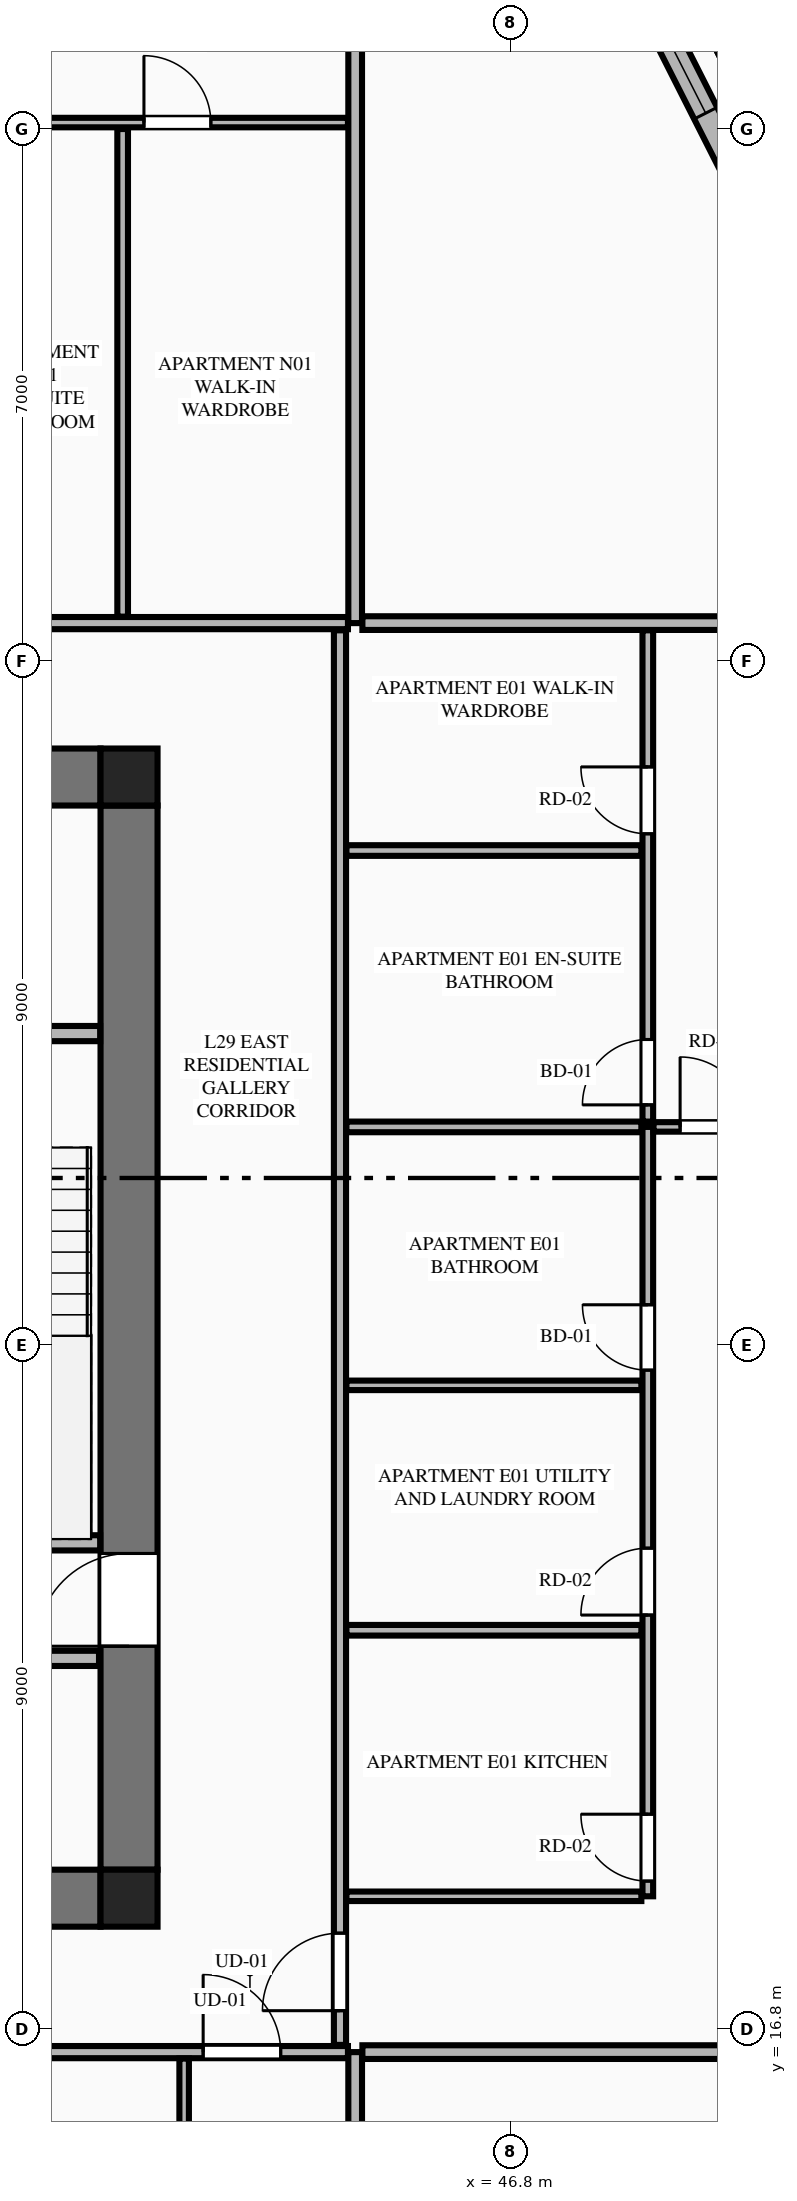
"""IFC4 building model, lengths in metres.
Left out: names, types, materials, properties, quantities, classifications, styles, units other than length and angle.
Written with IfcOpenShell. Run it as: python <this file> out.ifc"""

import sys

from ifc_helpers import new_model, si_unit, direction, frame, frame_2d, origin, origin_2d, place, context, subcontext, project, spatial, rectangle, extrude, element, fill, save


model = new_model("IFC4")
c1 = context("Model", 3, precision=1e-05, world=origin(), true_north=direction((0.0, 1.0)))
c2 = subcontext(c1, "Body", "Model", "MODEL_VIEW")
j1 = project(units=[si_unit("LENGTHUNIT", "METRE"), si_unit("PLANEANGLEUNIT", "RADIAN")], contexts=[c1])
p1 = place(None, origin())
s1 = spatial("IfcSite", under=j1, at=p1, CompositionType="ELEMENT")
p2 = place(p1, origin())
s2 = spatial("IfcBuilding", under=s1, at=p2, CompositionType="ELEMENT")
p3 = place(p2, frame((0.0, 0.0, 112.6)))
s3 = spatial("IfcBuildingStorey", under=s2, at=p3, CompositionType="ELEMENT", Elevation=112.6)
for number, where, z_axis, x_axis in (
    (1, (41.775, 18.525, 0.0), (0.0, 0.0, 1.0), (1.0, 0.0, 0.0)),
    (2, (41.775, 33.275, 0.0), (0.0, 0.0, 1.0), (1.0, 0.0, 0.0)),
):
    element("IfcColumn", number, at=place(p3, frame(where, z_axis=z_axis, x_axis=x_axis)), inside=s3, PredefinedType="COLUMN", context=c2, shape_type="SweptSolid", body=[
        extrude(rectangle(XDim=0.75, YDim=0.75, at=origin_2d()), origin(), (0.0, 0.0, 1.0), 3.55),
    ])
for number, where, z_axis, x_axis in (
    (3, (23.4, 18.525, 0.0), (0.0, 0.0, 1.0), (1.0, 0.0, 0.0)),
    (4, (23.4, 33.275, 0.0), (0.0, 0.0, 1.0), (1.0, 0.0, 0.0)),
):
    element("IfcWall", number, at=place(p3, frame(where, z_axis=z_axis, x_axis=x_axis)), inside=s3, PredefinedType="SHEAR", context=c2, shape_type="SweptSolid", body=[
        extrude(rectangle(XDim=18.0, YDim=0.75, at=frame_2d((9.0, 0.0))), origin(), (0.0, 0.0, 1.0), 3.34),
    ])
p4 = place(p3, frame((41.775, 18.9, 0.0), z_axis=(0.0, 0.0, 1.0), x_axis=(0.0, 1.0, 0.0)))
e5 = element("IfcWall", 5, at=p4, inside=s3, PredefinedType="SHEAR", context=c2, shape_type="SweptSolid", body=[
    extrude(rectangle(XDim=14.0, YDim=0.75, at=frame_2d((7.0, 0.0))), origin(), (0.0, 0.0, 1.0), 3.34),
])
p5 = place(p4, frame((2.94, 0.0, 0.0)))
e6 = element("IfcOpeningElement", 6, at=p5, cuts=e5, PredefinedType="OPENING", context=c2, shape_type="SweptSolid", body=[
    extrude(rectangle(XDim=1.22, YDim=2.25, at=frame_2d((0.61, 1.125))), frame((0.0, 0.385, 0.0), z_axis=(0.0, -1.0, 0.0), x_axis=(1.0, 0.0, 0.0)), (0.0, 0.0, 1.0), 0.77),
])
p6 = place(p3, frame((38.125, 23.2, 0.0), z_axis=(0.0, 0.0, 1.0), x_axis=(1.0, 0.0, 0.0)))
e7 = element("IfcWall", 7, at=p6, inside=s3, PredefinedType="PLUMBINGWALL", context=c2, shape_type="SweptSolid", body=[
    extrude(rectangle(XDim=3.27, YDim=0.2, at=frame_2d((1.635, 0.0))), origin(), (0.0, 0.0, 1.0), 3.34),
])
p7 = place(p3, frame((38.125, 29.9, 0.0), z_axis=(0.0, 0.0, 1.0), x_axis=(1.0, 0.0, 0.0)))
e8 = element("IfcWall", 8, at=p7, inside=s3, PredefinedType="PLUMBINGWALL", context=c2, shape_type="SweptSolid", body=[
    extrude(rectangle(XDim=3.27, YDim=0.2, at=frame_2d((1.635, 0.0))), origin(), (0.0, 0.0, 1.0), 3.34),
])
p8 = place(p7, frame((0.5, 0.0, 0.0)))
e9 = element("IfcOpeningElement", 9, at=p8, cuts=e8, PredefinedType="OPENING", context=c2, shape_type="SweptSolid", body=[
    extrude(rectangle(XDim=0.85, YDim=2.05, at=frame_2d((0.425, 1.025))), frame((0.0, 0.11, 0.0), z_axis=(0.0, -1.0, 0.0), x_axis=(1.0, 0.0, 0.0)), (0.0, 0.0, 1.0), 0.22),
])
p9 = place(p3, frame((23.42, 21.68, 0.0), z_axis=(0.0, 0.0, 1.0), x_axis=(1.0, 0.0, 0.0)))
e10 = element("IfcWall", 10, at=p9, inside=s3, PredefinedType="PLUMBINGWALL", context=c2, shape_type="SweptSolid", body=[
    extrude(rectangle(XDim=17.96, YDim=0.2, at=frame_2d((8.98, 0.0))), origin(), (0.0, 0.0, 1.0), 3.34),
])
p10 = place(p9, frame((11.6, 0.0, 0.0)))
e11 = element("IfcOpeningElement", 11, at=p10, cuts=e10, PredefinedType="OPENING", context=c2, shape_type="SweptSolid", body=[
    extrude(rectangle(XDim=1.1, YDim=2.2, at=frame_2d((0.55, 1.1))), frame((0.0, 0.11, 0.0), z_axis=(0.0, -1.0, 0.0), x_axis=(1.0, 0.0, 0.0)), (0.0, 0.0, 1.0), 0.22),
])
p11 = place(p9, frame((0.41, 0.0, 0.0)))
e12 = element("IfcOpeningElement", 12, at=p11, cuts=e10, PredefinedType="OPENING", context=c2, shape_type="SweptSolid", body=[
    extrude(rectangle(XDim=0.85, YDim=2.05, at=frame_2d((0.425, 1.025))), frame((0.0, 0.11, 0.0), z_axis=(0.0, -1.0, 0.0), x_axis=(1.0, 0.0, 0.0)), (0.0, 0.0, 1.0), 0.22),
])
p12 = place(p9, frame((13.78, 0.0, 0.0)))
e13 = element("IfcOpeningElement", 13, at=p12, cuts=e10, PredefinedType="OPENING", context=c2, shape_type="SweptSolid", body=[
    extrude(rectangle(XDim=0.85, YDim=2.05, at=frame_2d((0.425, 1.025))), frame((0.0, 0.11, 0.0), z_axis=(0.0, -1.0, 0.0), x_axis=(1.0, 0.0, 0.0)), (0.0, 0.0, 1.0), 0.22),
])
p13 = place(p9, frame((16.13, 0.0, 0.0)))
e14 = element("IfcOpeningElement", 14, at=p13, cuts=e10, PredefinedType="OPENING", context=c2, shape_type="SweptSolid", body=[
    extrude(rectangle(XDim=0.85, YDim=2.05, at=frame_2d((0.425, 1.025))), frame((0.0, 0.11, 0.0), z_axis=(0.0, -1.0, 0.0), x_axis=(1.0, 0.0, 0.0)), (0.0, 0.0, 1.0), 0.22),
])
p14 = place(p3, frame((50.251, 40.251, 0.0), z_axis=(0.0, 0.0, 1.0), x_axis=(-0.451548465867, 0.892246593142, 0.0)))
e15 = element("IfcWall", 15, at=p14, inside=s3, PredefinedType="STANDARD", context=c2, shape_type="SweptSolid", body=[
    extrude(rectangle(XDim=5.04, YDim=0.34, at=frame_2d((2.52, 0.0))), origin(), (0.0, 0.0, 1.0), 2.797),
])
p15 = place(p14, frame((1.97, 0.0, 0.75)))
e16 = element("IfcOpeningElement", 16, at=p15, cuts=e15, PredefinedType="OPENING", context=c2, shape_type="SweptSolid", body=[
    extrude(rectangle(XDim=1.1, YDim=1.897, at=frame_2d((0.55, 0.948))), frame((0.0, 0.18, 0.0), z_axis=(0.0, -1.0, 0.0), x_axis=(1.0, 0.0, 0.0)), (0.0, 0.0, 1.0), 0.36),
])
p16 = place(p3, frame((44.75, 4.105, 0.0), z_axis=(0.0, 0.0, 1.0), x_axis=(0.0, 1.0, 0.0)))
e17 = element("IfcWall", 17, at=p16, inside=s3, PredefinedType="PARTITIONING", context=c2, shape_type="SweptSolid", body=[
    extrude(rectangle(XDim=12.395, YDim=0.18, at=frame_2d((6.198, 0.0))), origin(), (0.0, 0.0, 1.0), 3.34),
])
p17 = place(p3, frame((28.663, 16.5, 0.0), z_axis=(0.0, 0.0, 1.0), x_axis=(1.0, 0.0, 0.0)))
e18 = element("IfcWall", 18, at=p17, inside=s3, PredefinedType="PARTITIONING", context=c2, shape_type="SweptSolid", body=[
    extrude(rectangle(XDim=15.992, YDim=0.16, at=frame_2d((7.996, 0.0))), origin(), (0.0, 0.0, 1.0), 3.34),
])
p18 = place(p17, frame((14.087, 0.0, 0.0)))
e19 = element("IfcOpeningElement", 19, at=p18, cuts=e18, PredefinedType="OPENING", context=c2, shape_type="SweptSolid", body=[
    extrude(rectangle(XDim=1.02, YDim=2.25, at=frame_2d((0.51, 1.125))), frame((0.0, 0.09, 0.0), z_axis=(0.0, -1.0, 0.0), x_axis=(1.0, 0.0, 0.0)), (0.0, 0.0, 1.0), 0.18),
])
p19 = place(p3, frame((42.5, 12.391, 0.0), z_axis=(0.0, 0.0, 1.0), x_axis=(0.0, 1.0, 0.0)))
e20 = element("IfcWall", 20, at=p19, inside=s3, PredefinedType="PARTITIONING", context=c2, shape_type="SweptSolid", body=[
    extrude(rectangle(XDim=4.024, YDim=0.125, at=frame_2d((2.012, 0.0))), origin(), (0.0, 0.0, 1.0), 2.722),
])
p20 = place(p3, frame((44.75, 35.3, 0.0), z_axis=(0.0, 0.0, 1.0), x_axis=(0.0, 1.0, 0.0)))
e21 = element("IfcWall", 21, at=p20, inside=s3, PredefinedType="PARTITIONING", context=c2, shape_type="SweptSolid", body=[
    extrude(rectangle(XDim=12.195, YDim=0.18, at=frame_2d((6.098, 0.0))), origin(), (0.0, 0.0, 1.0), 3.34),
])
p21 = place(p3, frame((20.145, 35.3, 0.0), z_axis=(0.0, 0.0, 1.0), x_axis=(1.0, 0.0, 0.0)))
e22 = element("IfcWall", 22, at=p21, inside=s3, PredefinedType="PARTITIONING", context=c2, shape_type="SweptSolid", body=[
    extrude(rectangle(XDim=24.51, YDim=0.16, at=frame_2d((12.255, 0.0))), origin(), (0.0, 0.0, 1.0), 3.34),
])
p22 = place(p21, frame((0.405, 0.0, 0.0)))
e23 = element("IfcOpeningElement", 23, at=p22, cuts=e22, PredefinedType="OPENING", context=c2, shape_type="SweptSolid", body=[
    extrude(rectangle(XDim=1.35, YDim=2.35, at=frame_2d((0.675, 1.175))), frame((0.0, 0.09, 0.0), z_axis=(0.0, -1.0, 0.0), x_axis=(1.0, 0.0, 0.0)), (0.0, 0.0, 1.0), 0.18),
])
p23 = place(p3, frame((34.643, 41.885, 0.0), z_axis=(0.0, 0.0, 1.0), x_axis=(1.0, 0.0, 0.0)))
e24 = element("IfcWall", 24, at=p23, inside=s3, PredefinedType="PARTITIONING", context=c2, shape_type="SweptSolid", body=[
    extrude(rectangle(XDim=10.012, YDim=0.125, at=frame_2d((5.006, 0.0))), origin(), (0.0, 0.0, 1.0), 3.34),
])
p24 = place(p23, frame((5.18, 0.0, 0.0)))
e25 = element("IfcOpeningElement", 25, at=p24, cuts=e24, PredefinedType="OPENING", context=c2, shape_type="SweptSolid", body=[
    extrude(rectangle(XDim=0.86, YDim=2.1, at=frame_2d((0.43, 1.05))), frame((0.0, 0.073, 0.0), z_axis=(0.0, -1.0, 0.0), x_axis=(1.0, 0.0, 0.0)), (0.0, 0.0, 1.0), 0.145),
])
p25 = place(p23, frame((7.328, 0.0, 0.0)))
e26 = element("IfcOpeningElement", 26, at=p25, cuts=e24, PredefinedType="OPENING", context=c2, shape_type="SweptSolid", body=[
    extrude(rectangle(XDim=0.88, YDim=2.15, at=frame_2d((0.44, 1.075))), frame((0.0, 0.073, 0.0), z_axis=(0.0, -1.0, 0.0), x_axis=(1.0, 0.0, 0.0)), (0.0, 0.0, 1.0), 0.145),
])
p26 = place(p23, frame((0.3, 0.0, 0.0)))
e27 = element("IfcOpeningElement", 27, at=p26, cuts=e24, PredefinedType="OPENING", context=c2, shape_type="SweptSolid", body=[
    extrude(rectangle(XDim=0.88, YDim=2.15, at=frame_2d((0.44, 1.075))), frame((0.0, 0.073, 0.0), z_axis=(0.0, -1.0, 0.0), x_axis=(1.0, 0.0, 0.0)), (0.0, 0.0, 1.0), 0.145),
])
p27 = place(p3, frame((41.691, 35.385, 0.0), z_axis=(0.0, 0.0, 1.0), x_axis=(0.0, 1.0, 0.0)))
e28 = element("IfcWall", 28, at=p27, inside=s3, PredefinedType="PLUMBINGWALL", context=c2, shape_type="SweptSolid", body=[
    extrude(rectangle(XDim=6.415, YDim=0.14, at=frame_2d((3.208, 0.0))), origin(), (0.0, 0.0, 1.0), 2.722),
])
p28 = place(p3, frame((44.845, 16.5, 0.0), z_axis=(0.0, 0.0, 1.0), x_axis=(1.0, 0.0, 0.0)))
e29 = element("IfcWall", 29, at=p28, inside=s3, PredefinedType="PARTITIONING", context=c2, shape_type="SweptSolid", body=[
    extrude(rectangle(XDim=7.77, YDim=0.18, at=frame_2d((3.885, 0.0))), origin(), (0.0, 0.0, 1.0), 3.34),
])
p29 = place(p3, frame((44.845, 35.3, 0.0), z_axis=(0.0, 0.0, 1.0), x_axis=(1.0, 0.0, 0.0)))
e30 = element("IfcWall", 30, at=p29, inside=s3, PredefinedType="PARTITIONING", context=c2, shape_type="SweptSolid", body=[
    extrude(rectangle(XDim=7.669, YDim=0.18, at=frame_2d((3.834, 0.0))), origin(), (0.0, 0.0, 1.0), 3.34),
])
p30 = place(p3, frame((44.55, 16.595, 0.0), z_axis=(0.0, 0.0, 1.0), x_axis=(0.0, 1.0, 0.0)))
e31 = element("IfcWall", 31, at=p30, inside=s3, PredefinedType="PARTITIONING", context=c2, shape_type="SweptSolid", body=[
    extrude(rectangle(XDim=18.61, YDim=0.16, at=frame_2d((9.305, 0.0))), origin(), (0.0, 0.0, 1.0), 3.34),
])
p31 = place(p30, frame((0.45, 0.0, 0.0)))
e32 = element("IfcOpeningElement", 32, at=p31, cuts=e31, PredefinedType="OPENING", context=c2, shape_type="SweptSolid", body=[
    extrude(rectangle(XDim=1.02, YDim=2.25, at=frame_2d((0.51, 1.125))), frame((0.0, 0.09, 0.0), z_axis=(0.0, -1.0, 0.0), x_axis=(1.0, 0.0, 0.0)), (0.0, 0.0, 1.0), 0.18),
])
p32 = place(p3, frame((44.635, 18.55, 0.0), z_axis=(0.0, 0.0, 1.0), x_axis=(1.0, 0.0, 0.0)))
e33 = element("IfcWall", 33, at=p32, inside=s3, PredefinedType="PARTITIONING", context=c2, shape_type="SweptSolid", body=[
    extrude(rectangle(XDim=3.88, YDim=0.125, at=frame_2d((1.94, 0.0))), origin(), (0.0, 0.0, 1.0), 2.722),
])
p33 = place(p3, frame((48.6, 18.55, 0.0), z_axis=(0.0, 0.0, 1.0), x_axis=(0.0, 1.0, 0.0)))
e34 = element("IfcWall", 34, at=p33, inside=s3, PredefinedType="PLUMBINGWALL", context=c2, shape_type="SweptSolid", body=[
    extrude(rectangle(XDim=10.122, YDim=0.14, at=frame_2d((5.061, 0.0))), origin(), (0.0, 0.0, 1.0), 3.34),
])
p34 = place(p33, frame((0.2, 0.0, 0.0)))
e35 = element("IfcOpeningElement", 35, at=p34, cuts=e34, PredefinedType="OPENING", context=c2, shape_type="SweptSolid", body=[
    extrude(rectangle(XDim=0.88, YDim=2.15, at=frame_2d((0.44, 1.075))), frame((0.0, 0.08, 0.0), z_axis=(0.0, -1.0, 0.0), x_axis=(1.0, 0.0, 0.0)), (0.0, 0.0, 1.0), 0.16),
])
p35 = place(p33, frame((3.7, 0.0, 0.0)))
e36 = element("IfcOpeningElement", 36, at=p35, cuts=e34, PredefinedType="OPENING", context=c2, shape_type="SweptSolid", body=[
    extrude(rectangle(XDim=0.88, YDim=2.15, at=frame_2d((0.44, 1.075))), frame((0.0, 0.08, 0.0), z_axis=(0.0, -1.0, 0.0), x_axis=(1.0, 0.0, 0.0)), (0.0, 0.0, 1.0), 0.16),
])
p36 = place(p33, frame((6.922, 0.0, 0.0)))
e37 = element("IfcOpeningElement", 37, at=p36, cuts=e34, PredefinedType="OPENING", context=c2, shape_type="SweptSolid", body=[
    extrude(rectangle(XDim=0.86, YDim=2.1, at=frame_2d((0.43, 1.05))), frame((0.0, 0.08, 0.0), z_axis=(0.0, -1.0, 0.0), x_axis=(1.0, 0.0, 0.0)), (0.0, 0.0, 1.0), 0.16),
])
p37 = place(p3, frame((48.6, 28.742, 0.0), z_axis=(0.0, 0.0, 1.0), x_axis=(0.0, 1.0, 0.0)))
e38 = element("IfcWall", 38, at=p37, inside=s3, PredefinedType="PLUMBINGWALL", context=c2, shape_type="SweptSolid", body=[
    extrude(rectangle(XDim=6.463, YDim=0.14, at=frame_2d((3.231, 0.0))), origin(), (0.0, 0.0, 1.0), 3.34),
])
p38 = place(p37, frame((0.22, 0.0, 0.0)))
e39 = element("IfcOpeningElement", 39, at=p38, cuts=e38, PredefinedType="OPENING", context=c2, shape_type="SweptSolid", body=[
    extrude(rectangle(XDim=0.86, YDim=2.1, at=frame_2d((0.43, 1.05))), frame((0.0, 0.08, 0.0), z_axis=(0.0, -1.0, 0.0), x_axis=(1.0, 0.0, 0.0)), (0.0, 0.0, 1.0), 0.16),
])
p39 = place(p37, frame((3.786, 0.0, 0.0)))
e40 = element("IfcOpeningElement", 40, at=p39, cuts=e38, PredefinedType="OPENING", context=c2, shape_type="SweptSolid", body=[
    extrude(rectangle(XDim=0.88, YDim=2.15, at=frame_2d((0.44, 1.075))), frame((0.0, 0.08, 0.0), z_axis=(0.0, -1.0, 0.0), x_axis=(1.0, 0.0, 0.0)), (0.0, 0.0, 1.0), 0.16),
])
p40 = place(p3, frame((44.635, 28.672, 0.0), z_axis=(0.0, 0.0, 1.0), x_axis=(1.0, 0.0, 0.0)))
e41 = element("IfcWall", 41, at=p40, inside=s3, PredefinedType="PLUMBINGWALL", context=c2, shape_type="SweptSolid", body=[
    extrude(rectangle(XDim=3.88, YDim=0.14, at=frame_2d((1.94, 0.0))), origin(), (0.0, 0.0, 1.0), 3.34),
])
p41 = place(p3, frame((48.675, 28.672, 0.0), z_axis=(0.0, 0.0, 1.0), x_axis=(1.0, 0.0, 0.0)))
e42 = element("IfcWall", 42, at=p41, inside=s3, PredefinedType="PARTITIONING", context=c2, shape_type="SweptSolid", body=[
    extrude(rectangle(XDim=7.208, YDim=0.125, at=frame_2d((3.604, 0.0))), origin(), (0.0, 0.0, 1.0), 3.34),
])
p42 = place(p41, frame((0.35, 0.0, 0.0)))
e43 = element("IfcOpeningElement", 43, at=p42, cuts=e42, PredefinedType="OPENING", context=c2, shape_type="SweptSolid", body=[
    extrude(rectangle(XDim=0.92, YDim=2.15, at=frame_2d((0.46, 1.075))), frame((0.0, 0.073, 0.0), z_axis=(0.0, -1.0, 0.0), x_axis=(1.0, 0.0, 0.0)), (0.0, 0.0, 1.0), 0.145),
])
p43 = place(p3, frame((44.635, 22.05, 0.0), z_axis=(0.0, 0.0, 1.0), x_axis=(1.0, 0.0, 0.0)))
e44 = element("IfcWall", 44, at=p43, inside=s3, PredefinedType="PLUMBINGWALL", context=c2, shape_type="SweptSolid", body=[
    extrude(rectangle(XDim=3.88, YDim=0.14, at=frame_2d((1.94, 0.0))), origin(), (0.0, 0.0, 1.0), 3.34),
])
p44 = place(p3, frame((44.635, 25.272, 0.0), z_axis=(0.0, 0.0, 1.0), x_axis=(1.0, 0.0, 0.0)))
e45 = element("IfcWall", 45, at=p44, inside=s3, PredefinedType="PARTITIONING", context=c2, shape_type="SweptSolid", body=[
    extrude(rectangle(XDim=3.88, YDim=0.125, at=frame_2d((1.94, 0.0))), origin(), (0.0, 0.0, 1.0), 3.34),
])
p45 = place(p3, frame((44.635, 32.308, 0.0), z_axis=(0.0, 0.0, 1.0), x_axis=(1.0, 0.0, 0.0)))
e46 = element("IfcWall", 46, at=p45, inside=s3, PredefinedType="PLUMBINGWALL", context=c2, shape_type="SweptSolid", body=[
    extrude(rectangle(XDim=3.88, YDim=0.14, at=frame_2d((1.94, 0.0))), origin(), (0.0, 0.0, 1.0), 3.34),
])
p46 = place(p5, origin())
e47 = element("IfcDoor", 47, at=p46, inside=s3, OperationType="SINGLE_SWING_LEFT", PredefinedType="DOOR", context=c2, shape_type="SweptSolid", body=[
    extrude(rectangle(XDim=1.22, YDim=2.25, at=frame_2d((0.61, 1.125))), frame((0.0, 0.025, 0.0), z_axis=(0.0, -1.0, 0.0), x_axis=(1.0, 0.0, 0.0)), (0.0, 0.0, 1.0), 0.05),
])
fill(e6, e47)
p47 = place(p15, origin())
e48 = element("IfcWindow", 48, at=p47, inside=s3, PartitioningType="SINGLE_PANEL", PredefinedType="WINDOW", context=c2, shape_type="SweptSolid", body=[
    extrude(rectangle(XDim=1.1, YDim=1.897, at=frame_2d((0.55, 0.948))), frame((0.0, 0.03, 0.0), z_axis=(0.0, -1.0, 0.0), x_axis=(1.0, 0.0, 0.0)), (0.0, 0.0, 1.0), 0.06),
])
fill(e16, e48)
p48 = place(p18, origin())
e49 = element("IfcDoor", 49, at=p48, inside=s3, OperationType="SINGLE_SWING_LEFT", PredefinedType="DOOR", context=c2, shape_type="SweptSolid", body=[
    extrude(rectangle(XDim=1.02, YDim=2.25, at=frame_2d((0.51, 1.125))), frame((0.0, 0.025, 0.0), z_axis=(0.0, -1.0, 0.0), x_axis=(1.0, 0.0, 0.0)), (0.0, 0.0, 1.0), 0.05),
])
fill(e19, e49)
p49 = place(p25, origin())
e50 = element("IfcDoor", 50, at=p49, inside=s3, OperationType="SINGLE_SWING_LEFT", PredefinedType="DOOR", context=c2, shape_type="SweptSolid", body=[
    extrude(rectangle(XDim=0.88, YDim=2.15, at=frame_2d((0.44, 1.075))), frame((0.0, 0.025, 0.0), z_axis=(0.0, -1.0, 0.0), x_axis=(1.0, 0.0, 0.0)), (0.0, 0.0, 1.0), 0.05),
])
fill(e26, e50)
p50 = place(p34, origin())
e51 = element("IfcDoor", 51, at=p50, inside=s3, OperationType="SINGLE_SWING_RIGHT", PredefinedType="DOOR", context=c2, shape_type="SweptSolid", body=[
    extrude(rectangle(XDim=0.88, YDim=2.15, at=frame_2d((0.44, 1.075))), frame((0.0, 0.025, 0.0), z_axis=(0.0, -1.0, 0.0), x_axis=(1.0, 0.0, 0.0)), (0.0, 0.0, 1.0), 0.05),
])
fill(e35, e51)
p51 = place(p35, origin())
e52 = element("IfcDoor", 52, at=p51, inside=s3, OperationType="SINGLE_SWING_LEFT", PredefinedType="DOOR", context=c2, shape_type="SweptSolid", body=[
    extrude(rectangle(XDim=0.88, YDim=2.15, at=frame_2d((0.44, 1.075))), frame((0.0, 0.025, 0.0), z_axis=(0.0, -1.0, 0.0), x_axis=(1.0, 0.0, 0.0)), (0.0, 0.0, 1.0), 0.05),
])
fill(e36, e52)
p52 = place(p36, origin())
e53 = element("IfcDoor", 53, at=p52, inside=s3, OperationType="SINGLE_SWING_RIGHT", PredefinedType="DOOR", context=c2, shape_type="SweptSolid", body=[
    extrude(rectangle(XDim=0.86, YDim=2.1, at=frame_2d((0.43, 1.05))), frame((0.0, 0.025, 0.0), z_axis=(0.0, -1.0, 0.0), x_axis=(1.0, 0.0, 0.0)), (0.0, 0.0, 1.0), 0.05),
])
fill(e37, e53)
p53 = place(p38, origin())
e54 = element("IfcDoor", 54, at=p53, inside=s3, OperationType="SINGLE_SWING_LEFT", PredefinedType="DOOR", context=c2, shape_type="SweptSolid", body=[
    extrude(rectangle(XDim=0.86, YDim=2.1, at=frame_2d((0.43, 1.05))), frame((0.0, 0.025, 0.0), z_axis=(0.0, -1.0, 0.0), x_axis=(1.0, 0.0, 0.0)), (0.0, 0.0, 1.0), 0.05),
])
fill(e39, e54)
p54 = place(p39, origin())
e55 = element("IfcDoor", 55, at=p54, inside=s3, OperationType="SINGLE_SWING_RIGHT", PredefinedType="DOOR", context=c2, shape_type="SweptSolid", body=[
    extrude(rectangle(XDim=0.88, YDim=2.15, at=frame_2d((0.44, 1.075))), frame((0.0, 0.025, 0.0), z_axis=(0.0, -1.0, 0.0), x_axis=(1.0, 0.0, 0.0)), (0.0, 0.0, 1.0), 0.05),
])
fill(e40, e55)
p55 = place(p31, origin())
e56 = element("IfcDoor", 56, at=p55, inside=s3, OperationType="SINGLE_SWING_LEFT", PredefinedType="DOOR", context=c2, shape_type="SweptSolid", body=[
    extrude(rectangle(XDim=1.02, YDim=2.25, at=frame_2d((0.51, 1.125))), frame((0.0, 0.025, 0.0), z_axis=(0.0, -1.0, 0.0), x_axis=(1.0, 0.0, 0.0)), (0.0, 0.0, 1.0), 0.05),
])
fill(e32, e56)
p56 = place(p42, origin())
e57 = element("IfcDoor", 57, at=p56, inside=s3, OperationType="SINGLE_SWING_LEFT", PredefinedType="DOOR", context=c2, shape_type="SweptSolid", body=[
    extrude(rectangle(XDim=0.92, YDim=2.15, at=frame_2d((0.46, 1.075))), frame((0.0, 0.025, 0.0), z_axis=(0.0, -1.0, 0.0), x_axis=(1.0, 0.0, 0.0)), (0.0, 0.0, 1.0), 0.05),
])
fill(e43, e57)
save(model, sys.argv[1])
